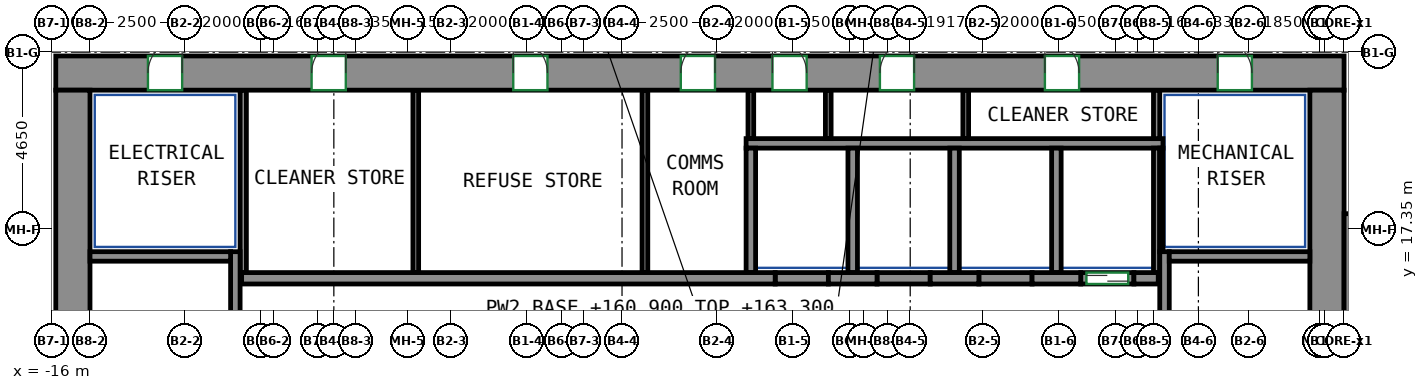
"""IFC4 building model, lengths in metres.
Left out: names, types, materials, properties, quantities, classifications, styles, units other than length and angle.
Written with IfcOpenShell. Run it as: python <this file> out.ifc"""

import sys

from ifc_helpers import new_model, si_unit, direction, frame, frame_2d, origin, place, context, subcontext, project, spatial, rectangle, extrude, source, transform, mapped, element, fill, save


model = new_model("IFC4")
c1 = context("Model", 3, precision=1e-05, world=origin(), true_north=direction((0.0, 1.0)))
c2 = subcontext(c1, "Body", "Model", "MODEL_VIEW")
j1 = project(units=[si_unit("LENGTHUNIT", "METRE"), si_unit("PLANEANGLEUNIT", "RADIAN")], contexts=[c1])
p1 = place(None, origin())
s1 = spatial("IfcSite", under=j1, at=p1, CompositionType="ELEMENT")
p2 = place(p1, origin())
s2 = spatial("IfcBuilding", under=s1, at=p2, CompositionType="ELEMENT")
p3 = place(p2, frame((0.0, 0.0, 160.9)))
s3 = spatial("IfcBuildingStorey", under=s2, at=p3, CompositionType="ELEMENT", Elevation=160.9)
m1 = source(origin(), c2, "Body", "SweptSolid", [
    extrude(rectangle(XDim=33.9, YDim=0.9, at=frame_2d((16.95, 0.0))), origin(), (0.0, 0.0, 1.0), 3.0),
])
p4 = place(p3, frame((-15.9, 21.45, 0.0), z_axis=(0.0, 0.0, 1.0), x_axis=(1.0, 0.0, 0.0)))
e1 = element("IfcWall", 1, at=p4, inside=s3, PredefinedType="SHEAR", context=c2, shape_type="MappedRepresentation", body=[
    mapped(m1, transform((0.0, 0.0, 0.0))),
])
p5 = place(p4, frame((6.731, 0.0, 0.0)))
e2 = element("IfcOpeningElement", 2, at=p5, cuts=e1, PredefinedType="OPENING", context=c2, shape_type="SweptSolid", body=[
    extrude(rectangle(XDim=0.9, YDim=2.1, at=frame_2d((0.45, 1.05))), frame((0.0, 0.46, 0.0), z_axis=(0.0, -1.0, 0.0), x_axis=(1.0, 0.0, 0.0)), (0.0, 0.0, 1.0), 0.92),
])
p6 = place(p4, frame((12.038, 0.0, 0.0)))
e3 = element("IfcOpeningElement", 3, at=p6, cuts=e1, PredefinedType="OPENING", context=c2, shape_type="SweptSolid", body=[
    extrude(rectangle(XDim=0.9, YDim=2.1, at=frame_2d((0.45, 1.05))), frame((0.0, 0.46, 0.0), z_axis=(0.0, -1.0, 0.0), x_axis=(1.0, 0.0, 0.0)), (0.0, 0.0, 1.0), 0.92),
])
p7 = place(p4, frame((16.446, 0.0, 0.0)))
e4 = element("IfcOpeningElement", 4, at=p7, cuts=e1, PredefinedType="OPENING", context=c2, shape_type="SweptSolid", body=[
    extrude(rectangle(XDim=0.9, YDim=2.1, at=frame_2d((0.45, 1.05))), frame((0.0, 0.46, 0.0), z_axis=(0.0, -1.0, 0.0), x_axis=(1.0, 0.0, 0.0)), (0.0, 0.0, 1.0), 0.92),
])
p8 = place(p4, frame((18.858, 0.0, 0.0)))
e5 = element("IfcOpeningElement", 5, at=p8, cuts=e1, PredefinedType="OPENING", context=c2, shape_type="SweptSolid", body=[
    extrude(rectangle(XDim=0.9, YDim=2.1, at=frame_2d((0.45, 1.05))), frame((0.0, 0.46, 0.0), z_axis=(0.0, -1.0, 0.0), x_axis=(1.0, 0.0, 0.0)), (0.0, 0.0, 1.0), 0.92),
])
p9 = place(p4, frame((21.686, 0.0, 0.0)))
e6 = element("IfcOpeningElement", 6, at=p9, cuts=e1, PredefinedType="OPENING", context=c2, shape_type="SweptSolid", body=[
    extrude(rectangle(XDim=0.9, YDim=2.1, at=frame_2d((0.45, 1.05))), frame((0.0, 0.46, 0.0), z_axis=(0.0, -1.0, 0.0), x_axis=(1.0, 0.0, 0.0)), (0.0, 0.0, 1.0), 0.92),
])
p10 = place(p4, frame((26.027, 0.0, 0.0)))
e7 = element("IfcOpeningElement", 7, at=p10, cuts=e1, PredefinedType="OPENING", context=c2, shape_type="SweptSolid", body=[
    extrude(rectangle(XDim=0.9, YDim=2.1, at=frame_2d((0.45, 1.05))), frame((0.0, 0.46, 0.0), z_axis=(0.0, -1.0, 0.0), x_axis=(1.0, 0.0, 0.0)), (0.0, 0.0, 1.0), 0.92),
])
p11 = place(p4, frame((2.425, 0.0, 0.0)))
e8 = element("IfcOpeningElement", 8, at=p11, cuts=e1, PredefinedType="OPENING", context=c2, shape_type="SweptSolid", body=[
    extrude(rectangle(XDim=0.9, YDim=2.1, at=frame_2d((0.45, 1.05))), frame((0.0, 0.46, 0.0), z_axis=(0.0, -1.0, 0.0), x_axis=(1.0, 0.0, 0.0)), (0.0, 0.0, 1.0), 0.92),
])
p12 = place(p4, frame((30.575, 0.0, 0.0)))
e9 = element("IfcOpeningElement", 9, at=p12, cuts=e1, PredefinedType="OPENING", context=c2, shape_type="SweptSolid", body=[
    extrude(rectangle(XDim=0.9, YDim=2.1, at=frame_2d((0.45, 1.05))), frame((0.0, 0.46, 0.0), z_axis=(0.0, -1.0, 0.0), x_axis=(1.0, 0.0, 0.0)), (0.0, 0.0, 1.0), 0.92),
])
m2 = source(origin(), c2, "Body", "SweptSolid", [
    extrude(rectangle(XDim=12.0, YDim=0.9, at=frame_2d((6.0, 0.0))), origin(), (0.0, 0.0, 1.0), 3.0),
])
for number, where, z_axis, x_axis in (
    (10, (-15.45, 9.0, 0.0), (0.0, 0.0, 1.0), (0.0, 1.0, 0.0)),
    (11, (17.55, 9.0, 0.0), (0.0, 0.0, 1.0), (0.0, 1.0, 0.0)),
):
    element("IfcWall", number, at=place(p3, frame(where, z_axis=z_axis, x_axis=x_axis)), inside=s3, PredefinedType="SHEAR", context=c2, shape_type="MappedRepresentation", body=[
        mapped(m2, transform((0.0, 0.0, 0.0))),
    ])
m3 = source(origin(), c2, "Body", "SweptSolid", [
    extrude(rectangle(XDim=7.75, YDim=0.25, at=frame_2d((3.875, 0.0))), origin(), (0.0, 0.0, 1.0), 3.0),
])
p13 = place(p3, frame((-11.175, 9.0, 0.0), z_axis=(0.0, 0.0, 1.0), x_axis=(0.0, 1.0, 0.0)))
e12 = element("IfcWall", 12, at=p13, inside=s3, PredefinedType="SHEAR", context=c2, shape_type="MappedRepresentation", body=[
    mapped(m3, transform((0.0, 0.0, 0.0))),
])
m4 = source(origin(), c2, "Body", "SweptSolid", [
    extrude(rectangle(XDim=3.7, YDim=0.25, at=frame_2d((1.85, 0.0))), origin(), (0.0, 0.0, 1.0), 3.0),
])
p14 = place(p3, frame((-15.0, 16.625, 0.0), z_axis=(0.0, 0.0, 1.0), x_axis=(1.0, 0.0, 0.0)))
e13 = element("IfcWall", 13, at=p14, inside=s3, PredefinedType="SHEAR", context=c2, shape_type="MappedRepresentation", body=[
    mapped(m4, transform((0.0, 0.0, 0.0))),
])
p15 = place(p3, frame((13.275, 9.0, 0.0), z_axis=(0.0, 0.0, 1.0), x_axis=(0.0, 1.0, 0.0)))
e14 = element("IfcWall", 14, at=p15, inside=s3, PredefinedType="SHEAR", context=c2, shape_type="MappedRepresentation", body=[
    mapped(m3, transform((0.0, 0.0, 0.0))),
])
m5 = source(origin(), c2, "Body", "SweptSolid", [
    extrude(rectangle(XDim=3.7, YDim=0.25, at=frame_2d((1.85, 0.0))), origin(), (0.0, 0.0, 1.0), 3.0),
])
p16 = place(p3, frame((13.4, 16.625, 0.0), z_axis=(0.0, 0.0, 1.0), x_axis=(1.0, 0.0, 0.0)))
e15 = element("IfcWall", 15, at=p16, inside=s3, PredefinedType="SHEAR", context=c2, shape_type="MappedRepresentation", body=[
    mapped(m5, transform((0.0, 0.0, 0.0))),
])
m6 = source(origin(), c2, "Body", "SweptSolid", [
    extrude(rectangle(XDim=8.0, YDim=0.35, at=frame_2d((4.0, 0.0))), origin(), (0.0, 0.0, 1.0), 3.0),
])
p17 = place(p3, frame((18.175, 9.75, 0.0), z_axis=(0.0, 0.0, 1.0), x_axis=(0.0, 1.0, 0.0)))
e16 = element("IfcWall", 16, at=p17, inside=s3, PredefinedType="SHEAR", context=c2, shape_type="MappedRepresentation", body=[
    mapped(m6, transform((0.0, 0.0, 0.0))),
])
m7 = source(origin(), c2, "Body", "SweptSolid", [
    extrude(rectangle(XDim=14.04, YDim=0.3, at=frame_2d((7.02, 0.0))), origin(), (0.0, 0.0, 1.0), 3.0),
])
p18 = place(p3, frame((-11.01, 16.05, 0.0), z_axis=(0.0, 0.0, 1.0), x_axis=(1.0, 0.0, 0.0)))
e17 = element("IfcWall", 17, at=p18, inside=s3, PredefinedType="SHEAR", context=c2, shape_type="MappedRepresentation", body=[
    mapped(m7, transform((0.0, 0.0, 0.0))),
])
m8 = source(origin(), c2, "Body", "SweptSolid", [
    extrude(rectangle(XDim=1.28, YDim=0.3, at=frame_2d((0.64, 0.0))), origin(), (0.0, 0.0, 1.0), 3.0),
])
p19 = place(p3, frame((4.43, 16.05, 0.0), z_axis=(0.0, 0.0, 1.0), x_axis=(1.0, 0.0, 0.0)))
e18 = element("IfcWall", 18, at=p19, inside=s3, PredefinedType="SHEAR", context=c2, shape_type="MappedRepresentation", body=[
    mapped(m8, transform((0.0, 0.0, 0.0))),
])
m9 = source(origin(), c2, "Body", "SweptSolid", [
    extrude(rectangle(XDim=1.28, YDim=0.3, at=frame_2d((0.64, 0.0))), origin(), (0.0, 0.0, 1.0), 3.0),
])
p20 = place(p3, frame((7.11, 16.05, 0.0), z_axis=(0.0, 0.0, 1.0), x_axis=(1.0, 0.0, 0.0)))
e19 = element("IfcWall", 19, at=p20, inside=s3, PredefinedType="SHEAR", context=c2, shape_type="MappedRepresentation", body=[
    mapped(m9, transform((0.0, 0.0, 0.0))),
])
p21 = place(p3, frame((9.79, 16.05, 0.0), z_axis=(0.0, 0.0, 1.0), x_axis=(1.0, 0.0, 0.0)))
e20 = element("IfcWall", 20, at=p21, inside=s3, PredefinedType="SHEAR", context=c2, shape_type="MappedRepresentation", body=[
    mapped(m8, transform((0.0, 0.0, 0.0))),
])
m10 = source(origin(), c2, "Body", "SweptSolid", [
    extrude(rectangle(XDim=0.64, YDim=0.3, at=frame_2d((0.32, 0.0))), origin(), (0.0, 0.0, 1.0), 3.0),
])
p22 = place(p3, frame((12.47, 16.05, 0.0), z_axis=(0.0, 0.0, 1.0), x_axis=(1.0, 0.0, 0.0)))
e21 = element("IfcWall", 21, at=p22, inside=s3, PredefinedType="SHEAR", context=c2, shape_type="MappedRepresentation", body=[
    mapped(m10, transform((0.0, 0.0, 0.0))),
])
m11 = source(origin(), c2, "Body", "SweptSolid", [
    extrude(rectangle(XDim=1.4, YDim=0.3, at=frame_2d((0.7, 0.0))), origin(), (0.0, 0.0, 1.0), 3.0),
])
p23 = place(p3, frame((11.07, 16.05, 0.0), z_axis=(0.0, 0.0, 1.0), x_axis=(1.0, 0.0, 0.0)))
e22 = element("IfcWall", 22, at=p23, inside=s3, PredefinedType="PARTITIONING", context=c2, shape_type="MappedRepresentation", body=[
    mapped(m11, transform((0.0, 0.0, 0.0))),
])
p24 = place(p23, frame((0.15, 0.0, 0.0)))
e23 = element("IfcOpeningElement", 23, at=p24, cuts=e22, PredefinedType="OPENING", context=c2, shape_type="SweptSolid", body=[
    extrude(rectangle(XDim=1.1, YDim=2.1, at=frame_2d((0.55, 1.05))), frame((0.0, 0.16, 0.0), z_axis=(0.0, -1.0, 0.0), x_axis=(1.0, 0.0, 0.0)), (0.0, 0.0, 1.0), 0.32),
])
p25 = place(p3, frame((3.03, 16.05, 0.0), z_axis=(0.0, 0.0, 1.0), x_axis=(1.0, 0.0, 0.0)))
e24 = element("IfcWall", 24, at=p25, inside=s3, PredefinedType="PARTITIONING", context=c2, shape_type="MappedRepresentation", body=[
    mapped(m11, transform((0.0, 0.0, 0.0))),
])
m12 = source(origin(), c2, "Body", "SweptSolid", [
    extrude(rectangle(XDim=1.4, YDim=0.3, at=frame_2d((0.7, 0.0))), origin(), (0.0, 0.0, 1.0), 3.0),
])
for number, where, z_axis, x_axis in (
    (25, (5.71, 16.05, 0.0), (0.0, 0.0, 1.0), (1.0, 0.0, 0.0)),
    (26, (8.39, 16.05, 0.0), (0.0, 0.0, 1.0), (1.0, 0.0, 0.0)),
):
    element("IfcWall", number, at=place(p3, frame(where, z_axis=z_axis, x_axis=x_axis)), inside=s3, PredefinedType="PARTITIONING", context=c2, shape_type="MappedRepresentation", body=[
        mapped(m12, transform((0.0, 0.0, 0.0))),
    ])
m13 = source(origin(), c2, "Body", "SweptSolid", [
    extrude(rectangle(XDim=10.97, YDim=0.25, at=frame_2d((5.485, 0.0))), origin(), (0.0, 0.0, 1.0), 3.0),
])
p26 = place(p3, frame((2.265, 19.6, 0.0), z_axis=(0.0, 0.0, 1.0), x_axis=(1.0, 0.0, 0.0)))
e27 = element("IfcWall", 27, at=p26, inside=s3, PredefinedType="PARTITIONING", context=c2, shape_type="MappedRepresentation", body=[
    mapped(m13, transform((0.0, 0.0, 0.0))),
])
m14 = source(origin(), c2, "Body", "SweptSolid", [
    extrude(rectangle(XDim=3.275, YDim=0.165, at=frame_2d((1.638, 0.0))), origin(), (0.0, 0.0, 1.0), 3.0),
])
p27 = place(p3, frame((13.067, 16.2, 0.0), z_axis=(0.0, 0.0, 1.0), x_axis=(0.0, 1.0, 0.0)))
e28 = element("IfcWall", 28, at=p27, inside=s3, PredefinedType="PARTITIONING", context=c2, shape_type="MappedRepresentation", body=[
    mapped(m14, transform((0.0, 0.0, 0.0))),
])
m15 = source(origin(), c2, "Body", "SweptSolid", [
    extrude(rectangle(XDim=1.275, YDim=0.165, at=frame_2d((0.637, 0.0))), origin(), (0.0, 0.0, 1.0), 3.0),
])
p28 = place(p3, frame((13.067, 19.725, 0.0), z_axis=(0.0, 0.0, 1.0), x_axis=(0.0, 1.0, 0.0)))
e29 = element("IfcWall", 29, at=p28, inside=s3, PredefinedType="PARTITIONING", context=c2, shape_type="MappedRepresentation", body=[
    mapped(m15, transform((0.0, 0.0, 0.0))),
])
m16 = source(origin(), c2, "Body", "SweptSolid", [
    extrude(rectangle(XDim=4.8, YDim=0.165, at=frame_2d((2.4, 0.0))), origin(), (0.0, 0.0, 1.0), 3.0),
])
p29 = place(p3, frame((-10.968, 16.2, 0.0), z_axis=(0.0, 0.0, 1.0), x_axis=(0.0, 1.0, 0.0)))
e30 = element("IfcWall", 30, at=p29, inside=s3, PredefinedType="PARTITIONING", context=c2, shape_type="MappedRepresentation", body=[
    mapped(m16, transform((0.0, 0.0, 0.0))),
])
m17 = source(origin(), c2, "Body", "SweptSolid", [
    extrude(rectangle(XDim=3.275, YDim=0.25, at=frame_2d((1.638, 0.0))), origin(), (0.0, 0.0, 1.0), 3.0),
])
p30 = place(p3, frame((10.43, 16.2, 0.0), z_axis=(0.0, 0.0, 1.0), x_axis=(0.0, 1.0, 0.0)))
e31 = element("IfcWall", 31, at=p30, inside=s3, PredefinedType="PARTITIONING", context=c2, shape_type="MappedRepresentation", body=[
    mapped(m17, transform((0.0, 0.0, 0.0))),
])
m18 = source(origin(), c2, "Body", "SweptSolid", [
    extrude(rectangle(XDim=2.725, YDim=0.085, at=frame_2d((1.363, 0.0))), origin(), (0.0, 0.0, 1.0), 3.0),
])
p31 = place(p3, frame((13.192, 16.75, 0.0), z_axis=(0.0, 0.0, 1.0), x_axis=(0.0, 1.0, 0.0)))
e32 = element("IfcWall", 32, at=p31, inside=s3, PredefinedType="PARTITIONING", context=c2, shape_type="MappedRepresentation", body=[
    mapped(m18, transform((0.0, 0.0, 0.0))),
])
for number, where, z_axis, x_axis in (
    (33, (2.39, 16.2, 0.0), (0.0, 0.0, 1.0), (0.0, 1.0, 0.0)),
    (34, (5.07, 16.2, 0.0), (0.0, 0.0, 1.0), (0.0, 1.0, 0.0)),
    (35, (7.75, 16.2, 0.0), (0.0, 0.0, 1.0), (0.0, 1.0, 0.0)),
):
    element("IfcWall", number, at=place(p3, frame(where, z_axis=z_axis, x_axis=x_axis)), inside=s3, PredefinedType="PARTITIONING", context=c2, shape_type="MappedRepresentation", body=[
        mapped(m17, transform((0.0, 0.0, 0.0))),
    ])
m19 = source(origin(), c2, "Body", "SweptSolid", [
    extrude(rectangle(XDim=4.8, YDim=0.15, at=frame_2d((2.4, 0.0))), origin(), (0.0, 0.0, 1.0), 3.0),
])
for number, where, z_axis, x_axis in (
    (36, (-6.427, 16.2, 0.0), (0.0, 0.0, 1.0), (0.0, 1.0, 0.0)),
    (37, (-0.397, 16.2, 0.0), (0.0, 0.0, 1.0), (0.0, 1.0, 0.0)),
):
    element("IfcWall", number, at=place(p3, frame(where, z_axis=z_axis, x_axis=x_axis)), inside=s3, PredefinedType="PARTITIONING", context=c2, shape_type="MappedRepresentation", body=[
        mapped(m19, transform((0.0, 0.0, 0.0))),
    ])
m20 = source(origin(), c2, "Body", "SweptSolid", [
    extrude(rectangle(XDim=1.275, YDim=0.15, at=frame_2d((0.637, 0.0))), origin(), (0.0, 0.0, 1.0), 3.0),
])
for number, where, z_axis, x_axis in (
    (38, (2.39, 19.725, 0.0), (0.0, 0.0, 1.0), (0.0, 1.0, 0.0)),
    (39, (4.427, 19.725, 0.0), (0.0, 0.0, 1.0), (0.0, 1.0, 0.0)),
    (40, (8.045, 19.725, 0.0), (0.0, 0.0, 1.0), (0.0, 1.0, 0.0)),
):
    element("IfcWall", number, at=place(p3, frame(where, z_axis=z_axis, x_axis=x_axis)), inside=s3, PredefinedType="PARTITIONING", context=c2, shape_type="MappedRepresentation", body=[
        mapped(m20, transform((0.0, 0.0, 0.0))),
    ])
p32 = place(p24, origin())
e41 = element("IfcDoor", 41, at=p32, inside=s3, OperationType="DOUBLE_DOOR_SLIDING", PredefinedType="DOOR", context=c2, shape_type="SweptSolid", body=[
    extrude(rectangle(XDim=1.1, YDim=2.1, at=frame_2d((0.55, 1.05))), frame((0.0, 0.025, 0.0), z_axis=(0.0, -1.0, 0.0), x_axis=(1.0, 0.0, 0.0)), (0.0, 0.0, 1.0), 0.05),
])
fill(e23, e41)
p33 = place(p5, origin())
e42 = element("IfcDoor", 42, at=p33, inside=s3, OperationType="SINGLE_SWING_RIGHT", PredefinedType="DOOR", context=c2, shape_type="SweptSolid", body=[
    extrude(rectangle(XDim=0.9, YDim=2.1, at=frame_2d((0.45, 1.05))), frame((0.0, -0.305, 0.0), z_axis=(0.0, -1.0, 0.0), x_axis=(1.0, 0.0, 0.0)), (0.0, 0.0, 1.0), 0.05),
])
fill(e2, e42)
p34 = place(p6, origin())
e43 = element("IfcDoor", 43, at=p34, inside=s3, OperationType="SINGLE_SWING_LEFT", PredefinedType="DOOR", context=c2, shape_type="SweptSolid", body=[
    extrude(rectangle(XDim=0.9, YDim=2.1, at=frame_2d((0.45, 1.05))), frame((0.0, -0.305, 0.0), z_axis=(0.0, -1.0, 0.0), x_axis=(1.0, 0.0, 0.0)), (0.0, 0.0, 1.0), 0.05),
])
fill(e3, e43)
p35 = place(p7, origin())
e44 = element("IfcDoor", 44, at=p35, inside=s3, OperationType="SINGLE_SWING_RIGHT", PredefinedType="DOOR", context=c2, shape_type="SweptSolid", body=[
    extrude(rectangle(XDim=0.9, YDim=2.1, at=frame_2d((0.45, 1.05))), frame((0.0, -0.305, 0.0), z_axis=(0.0, -1.0, 0.0), x_axis=(1.0, 0.0, 0.0)), (0.0, 0.0, 1.0), 0.05),
])
fill(e4, e44)
p36 = place(p8, origin())
e45 = element("IfcDoor", 45, at=p36, inside=s3, OperationType="SINGLE_SWING_LEFT", PredefinedType="DOOR", context=c2, shape_type="SweptSolid", body=[
    extrude(rectangle(XDim=0.9, YDim=2.1, at=frame_2d((0.45, 1.05))), frame((0.0, -0.305, 0.0), z_axis=(0.0, -1.0, 0.0), x_axis=(1.0, 0.0, 0.0)), (0.0, 0.0, 1.0), 0.05),
])
fill(e5, e45)
p37 = place(p9, origin())
e46 = element("IfcDoor", 46, at=p37, inside=s3, OperationType="SINGLE_SWING_RIGHT", PredefinedType="DOOR", context=c2, shape_type="SweptSolid", body=[
    extrude(rectangle(XDim=0.9, YDim=2.1, at=frame_2d((0.45, 1.05))), frame((0.0, -0.305, 0.0), z_axis=(0.0, -1.0, 0.0), x_axis=(1.0, 0.0, 0.0)), (0.0, 0.0, 1.0), 0.05),
])
fill(e6, e46)
p38 = place(p10, origin())
e47 = element("IfcDoor", 47, at=p38, inside=s3, OperationType="SINGLE_SWING_LEFT", PredefinedType="DOOR", context=c2, shape_type="SweptSolid", body=[
    extrude(rectangle(XDim=0.9, YDim=2.1, at=frame_2d((0.45, 1.05))), frame((0.0, -0.305, 0.0), z_axis=(0.0, -1.0, 0.0), x_axis=(1.0, 0.0, 0.0)), (0.0, 0.0, 1.0), 0.05),
])
fill(e7, e47)
p39 = place(p11, origin())
e48 = element("IfcDoor", 48, at=p39, inside=s3, OperationType="SINGLE_SWING_RIGHT", PredefinedType="DOOR", context=c2, shape_type="SweptSolid", body=[
    extrude(rectangle(XDim=0.9, YDim=2.1, at=frame_2d((0.45, 1.05))), frame((0.0, -0.305, 0.0), z_axis=(0.0, -1.0, 0.0), x_axis=(1.0, 0.0, 0.0)), (0.0, 0.0, 1.0), 0.05),
])
fill(e8, e48)
p40 = place(p12, origin())
e49 = element("IfcDoor", 49, at=p40, inside=s3, OperationType="SINGLE_SWING_LEFT", PredefinedType="DOOR", context=c2, shape_type="SweptSolid", body=[
    extrude(rectangle(XDim=0.9, YDim=2.1, at=frame_2d((0.45, 1.05))), frame((0.0, -0.305, 0.0), z_axis=(0.0, -1.0, 0.0), x_axis=(1.0, 0.0, 0.0)), (0.0, 0.0, 1.0), 0.05),
])
fill(e9, e49)
save(model, sys.argv[1])
